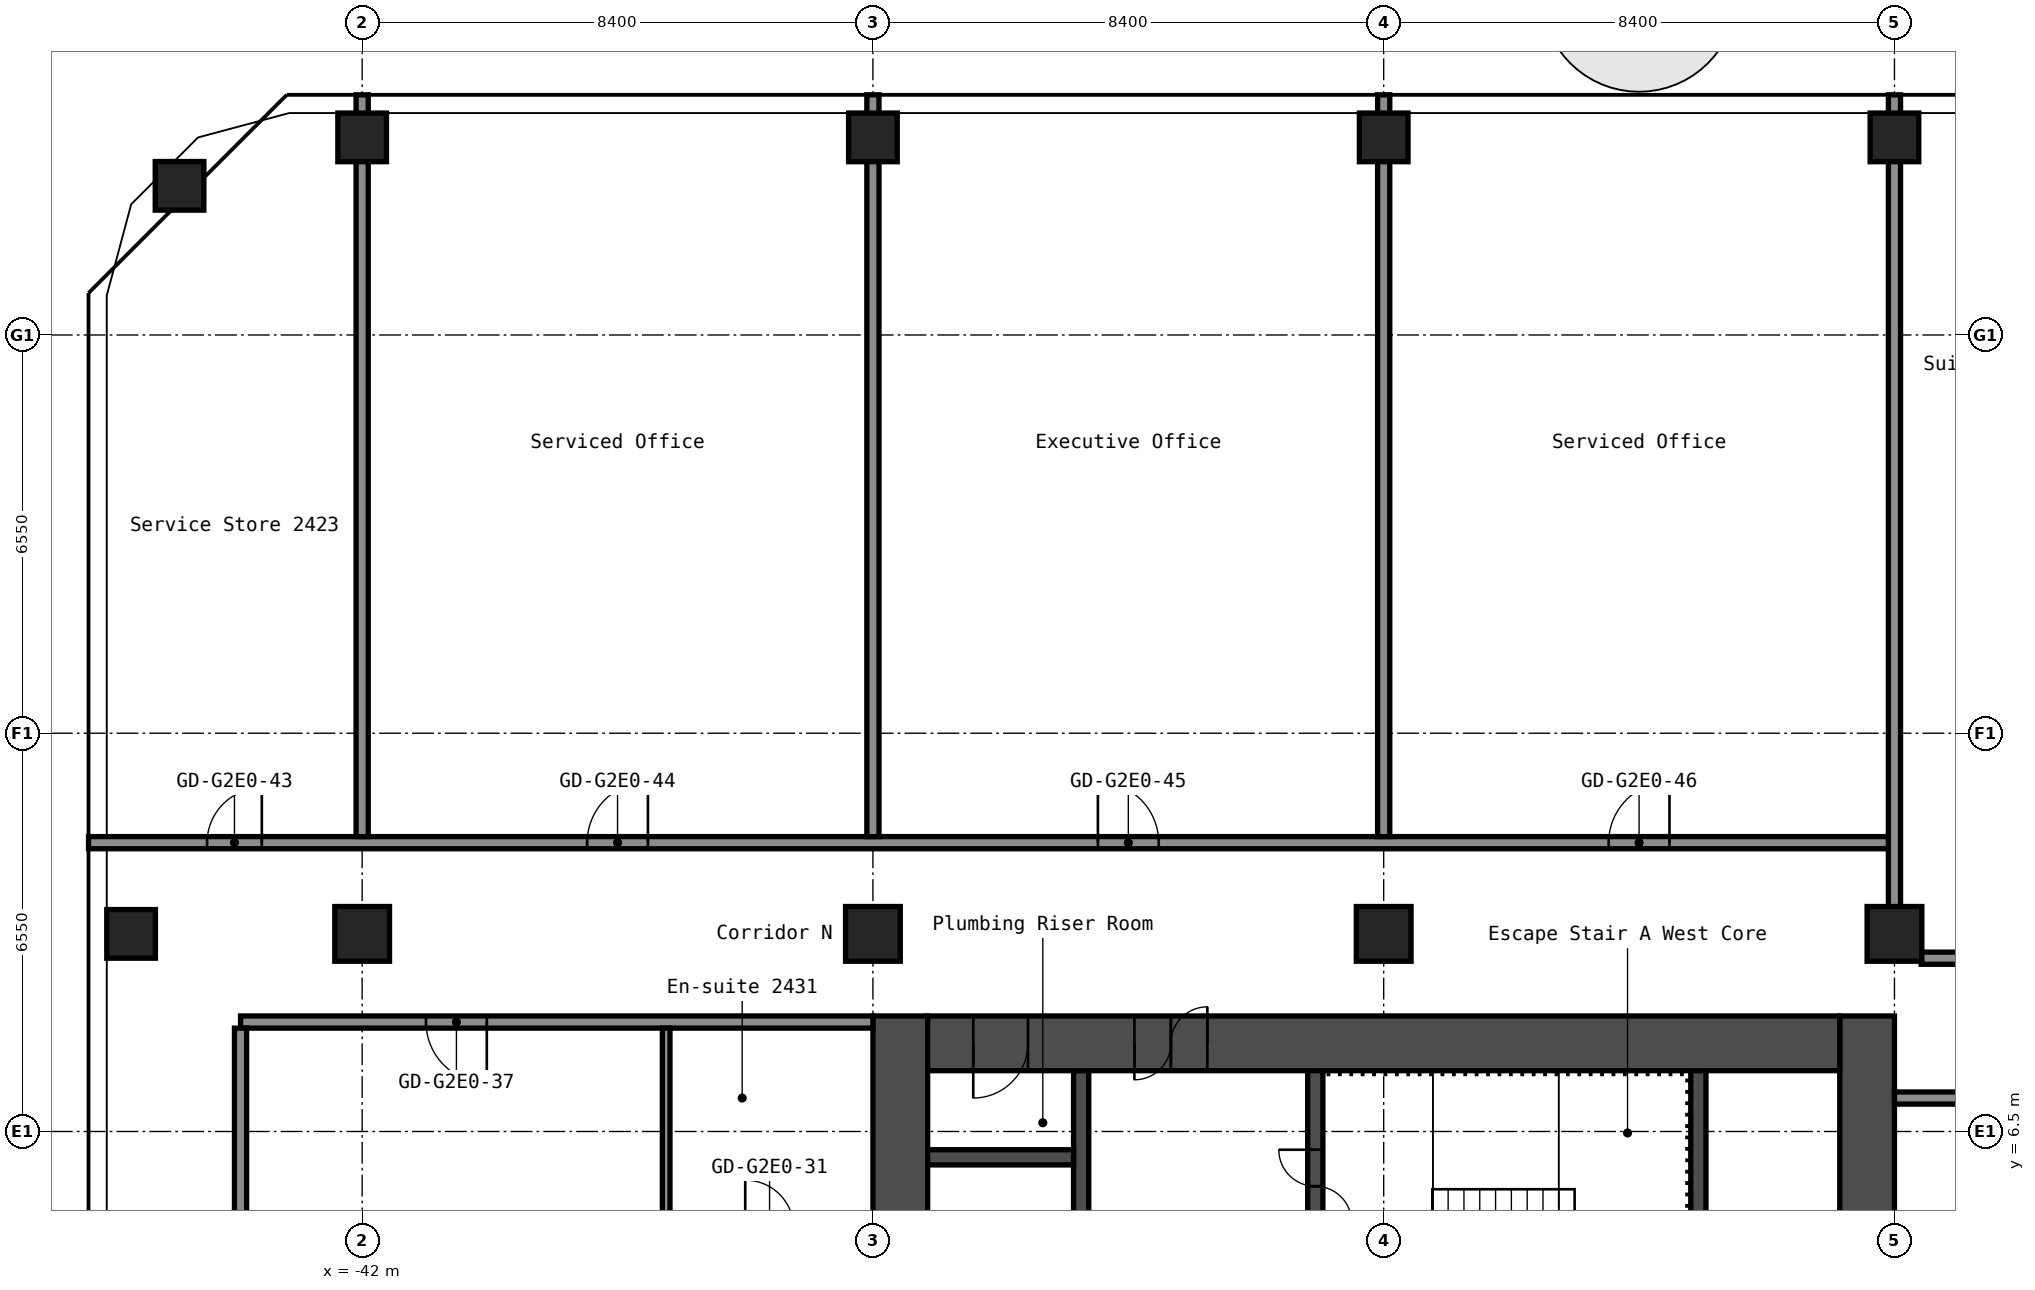
"""IFC4 building model, lengths in metres.
Left out: names, types, materials, properties, quantities, classifications, styles, units other than length and angle.
Written with IfcOpenShell. Run it as: python <this file> out.ifc"""

import sys

from ifc_helpers import new_model, si_unit, direction, frame, frame_2d, origin, origin_2d, place, context, subcontext, project, spatial, rectangle, hollow_rectangle, extrude, element, fill, save


model = new_model("IFC4")
c1 = context("Model", 3, precision=1e-05, world=origin(), true_north=direction((0.0, 1.0)))
c2 = subcontext(c1, "Body", "Model", "MODEL_VIEW")
j1 = project(units=[si_unit("LENGTHUNIT", "METRE"), si_unit("PLANEANGLEUNIT", "RADIAN")], contexts=[c1])
p1 = place(None, origin())
s1 = spatial("IfcSite", under=j1, at=p1, CompositionType="ELEMENT")
p2 = place(p1, origin())
s2 = spatial("IfcBuilding", under=s1, at=p2, CompositionType="ELEMENT")
p3 = place(p2, frame((0.0, 0.0, 88.2)))
s3 = spatial("IfcBuildingStorey", under=s2, at=p3, CompositionType="ELEMENT", Elevation=88.2)
for number, where, z_axis, x_axis in (
    (1, (-45.8, 9.75, 0.0), (0.0, 0.0, 1.0), (1.0, 0.0, 0.0)),
    (2, (-45.003, 22.053, 0.0), (0.0, 0.0, 1.0), (1.0, 0.0, 0.0)),
):
    element("IfcColumn", number, at=place(p3, frame(where, z_axis=z_axis, x_axis=x_axis)), inside=s3, PredefinedType="COLUMN", context=c2, shape_type="SweptSolid", body=[
        extrude(hollow_rectangle(XDim=0.8, YDim=0.8, WallThickness=0.032, at=origin_2d()), origin(), (0.0, 0.0, 1.0), 2.8),
    ])
p4 = place(p3, frame((-42.0, 9.75, 0.0), z_axis=(0.0, 0.0, 1.0), x_axis=(1.0, 0.0, 0.0)))
e3 = element("IfcColumn", 3, at=p4, inside=s3, PredefinedType="COLUMN", context=c2, shape_type="SweptSolid", body=[
    extrude(hollow_rectangle(XDim=0.9, YDim=0.9, WallThickness=0.036, at=origin_2d()), origin(), (0.0, 0.0, 1.0), 2.8),
])
p5 = place(p3, frame((-42.0, 22.85, 0.0), z_axis=(0.0, 0.0, 1.0), x_axis=(1.0, 0.0, 0.0)))
e4 = element("IfcColumn", 4, at=p5, inside=s3, PredefinedType="COLUMN", context=c2, shape_type="SweptSolid", body=[
    extrude(hollow_rectangle(XDim=0.8, YDim=0.8, WallThickness=0.032, at=origin_2d()), origin(), (0.0, 0.0, 1.0), 2.8),
])
p6 = place(p3, frame((-33.6, 9.75, 0.0), z_axis=(0.0, 0.0, 1.0), x_axis=(1.0, 0.0, 0.0)))
e5 = element("IfcColumn", 5, at=p6, inside=s3, PredefinedType="COLUMN", context=c2, shape_type="SweptSolid", body=[
    extrude(hollow_rectangle(XDim=0.9, YDim=0.9, WallThickness=0.036, at=origin_2d()), origin(), (0.0, 0.0, 1.0), 2.8),
])
p7 = place(p3, frame((-33.6, 22.85, 0.0), z_axis=(0.0, 0.0, 1.0), x_axis=(1.0, 0.0, 0.0)))
e6 = element("IfcColumn", 6, at=p7, inside=s3, PredefinedType="COLUMN", context=c2, shape_type="SweptSolid", body=[
    extrude(hollow_rectangle(XDim=0.8, YDim=0.8, WallThickness=0.032, at=origin_2d()), origin(), (0.0, 0.0, 1.0), 2.8),
])
p8 = place(p3, frame((-25.2, 9.75, 0.0), z_axis=(0.0, 0.0, 1.0), x_axis=(1.0, 0.0, 0.0)))
e7 = element("IfcColumn", 7, at=p8, inside=s3, PredefinedType="COLUMN", context=c2, shape_type="SweptSolid", body=[
    extrude(hollow_rectangle(XDim=0.9, YDim=0.9, WallThickness=0.036, at=origin_2d()), origin(), (0.0, 0.0, 1.0), 2.8),
])
p9 = place(p3, frame((-25.2, 22.85, 0.0), z_axis=(0.0, 0.0, 1.0), x_axis=(1.0, 0.0, 0.0)))
e8 = element("IfcColumn", 8, at=p9, inside=s3, PredefinedType="COLUMN", context=c2, shape_type="SweptSolid", body=[
    extrude(hollow_rectangle(XDim=0.8, YDim=0.8, WallThickness=0.032, at=origin_2d()), origin(), (0.0, 0.0, 1.0), 2.8),
])
p10 = place(p3, frame((-16.8, 9.75, 0.0), z_axis=(0.0, 0.0, 1.0), x_axis=(1.0, 0.0, 0.0)))
e9 = element("IfcColumn", 9, at=p10, inside=s3, PredefinedType="COLUMN", context=c2, shape_type="SweptSolid", body=[
    extrude(hollow_rectangle(XDim=0.9, YDim=0.9, WallThickness=0.036, at=origin_2d()), origin(), (0.0, 0.0, 1.0), 2.8),
])
p11 = place(p3, frame((-16.8, 22.85, 0.0), z_axis=(0.0, 0.0, 1.0), x_axis=(1.0, 0.0, 0.0)))
e10 = element("IfcColumn", 10, at=p11, inside=s3, PredefinedType="COLUMN", context=c2, shape_type="SweptSolid", body=[
    extrude(hollow_rectangle(XDim=0.8, YDim=0.8, WallThickness=0.032, at=origin_2d()), origin(), (0.0, 0.0, 1.0), 2.8),
])
p12 = place(p3, frame((-17.25, -8.4, 0.0), z_axis=(0.0, 0.0, 1.0), x_axis=(0.0, 1.0, 0.0)))
e11 = element("IfcWall", 11, at=p12, inside=s3, PredefinedType="SHEAR", context=c2, shape_type="SweptSolid", body=[
    extrude(rectangle(XDim=16.8, YDim=0.9, at=frame_2d((8.4, 0.0))), origin(), (0.0, 0.0, 1.0), 2.8),
])
p13 = place(p12, frame((7.6, 0.0, 0.0)))
e12 = element("IfcOpeningElement", 12, at=p13, cuts=e11, PredefinedType="OPENING", context=c2, shape_type="SweptSolid", body=[
    extrude(rectangle(XDim=1.2, YDim=2.1, at=frame_2d((0.6, 1.05))), frame((0.0, 0.46, 0.0), z_axis=(0.0, -1.0, 0.0), x_axis=(1.0, 0.0, 0.0)), (0.0, 0.0, 1.0), 0.92),
])
p14 = place(p3, frame((-33.15, -8.4, 0.0), z_axis=(0.0, 0.0, 1.0), x_axis=(0.0, 1.0, 0.0)))
e13 = element("IfcWall", 13, at=p14, inside=s3, PredefinedType="SHEAR", context=c2, shape_type="SweptSolid", body=[
    extrude(rectangle(XDim=16.8, YDim=0.9, at=frame_2d((8.4, 0.0))), origin(), (0.0, 0.0, 1.0), 2.8),
])
p15 = place(p3, frame((-32.7, 7.95, 0.0), z_axis=(0.0, 0.0, 1.0), x_axis=(1.0, 0.0, 0.0)))
e14 = element("IfcWall", 14, at=p15, inside=s3, PredefinedType="SHEAR", context=c2, shape_type="SweptSolid", body=[
    extrude(rectangle(XDim=15.0, YDim=0.9, at=frame_2d((7.5, 0.0))), origin(), (0.0, 0.0, 1.0), 2.8),
])
p16 = place(p15, frame((3.4, 0.0, 0.0)))
e15 = element("IfcOpeningElement", 15, at=p16, cuts=e14, PredefinedType="OPENING", context=c2, shape_type="SweptSolid", body=[
    extrude(rectangle(XDim=1.2, YDim=2.1, at=frame_2d((0.6, 1.05))), frame((0.0, 0.46, 0.0), z_axis=(0.0, -1.0, 0.0), x_axis=(1.0, 0.0, 0.0)), (0.0, 0.0, 1.0), 0.92),
])
p17 = place(p15, frame((0.75, 0.0, 0.0)))
e16 = element("IfcOpeningElement", 16, at=p17, cuts=e14, PredefinedType="OPENING", context=c2, shape_type="SweptSolid", body=[
    extrude(rectangle(XDim=0.9, YDim=2.1, at=frame_2d((0.45, 1.05))), frame((0.0, 0.46, 0.0), z_axis=(0.0, -1.0, 0.0), x_axis=(1.0, 0.0, 0.0)), (0.0, 0.0, 1.0), 0.92),
])
p18 = place(p3, frame((-20.025, 1.2, 0.0), z_axis=(0.0, 0.0, 1.0), x_axis=(0.0, 1.0, 0.0)))
e17 = element("IfcWall", 17, at=p18, inside=s3, PredefinedType="SHEAR", context=c2, shape_type="SweptSolid", body=[
    extrude(rectangle(XDim=6.3, YDim=0.25, at=frame_2d((3.15, 0.0))), origin(), (0.0, 0.0, 1.0), 2.8),
])
p19 = place(p3, frame((-26.325, 3.75, 0.0), z_axis=(0.0, 0.0, 1.0), x_axis=(0.0, 1.0, 0.0)))
e18 = element("IfcWall", 18, at=p19, inside=s3, PredefinedType="SHEAR", context=c2, shape_type="SweptSolid", body=[
    extrude(rectangle(XDim=3.75, YDim=0.25, at=frame_2d((1.875, 0.0))), origin(), (0.0, 0.0, 1.0), 2.8),
])
p20 = place(p19, frame((1.25, 0.0, 0.0)))
e19 = element("IfcOpeningElement", 19, at=p20, cuts=e18, PredefinedType="OPENING", context=c2, shape_type="SweptSolid", body=[
    extrude(rectangle(XDim=1.2, YDim=2.1, at=frame_2d((0.6, 1.05))), frame((0.0, 0.135, 0.0), z_axis=(0.0, -1.0, 0.0), x_axis=(1.0, 0.0, 0.0)), (0.0, 0.0, 1.0), 0.27),
])
p21 = place(p3, frame((-30.175, 1.45, 0.0), z_axis=(0.0, 0.0, 1.0), x_axis=(0.0, 1.0, 0.0)))
e20 = element("IfcWall", 20, at=p21, inside=s3, PredefinedType="SHEAR", context=c2, shape_type="SweptSolid", body=[
    extrude(rectangle(XDim=6.05, YDim=0.25, at=frame_2d((3.025, 0.0))), origin(), (0.0, 0.0, 1.0), 2.8),
])
p22 = place(p21, frame((2.625, 0.0, 0.0)))
e21 = element("IfcOpeningElement", 21, at=p22, cuts=e20, PredefinedType="OPENING", context=c2, shape_type="SweptSolid", body=[
    extrude(rectangle(XDim=1.1, YDim=2.1, at=frame_2d((0.55, 1.05))), frame((0.0, 0.135, 0.0), z_axis=(0.0, -1.0, 0.0), x_axis=(1.0, 0.0, 0.0)), (0.0, 0.0, 1.0), 0.27),
])
p23 = place(p3, frame((-32.7, 6.075, 0.0), z_axis=(0.0, 0.0, 1.0), x_axis=(1.0, 0.0, 0.0)))
e22 = element("IfcWall", 22, at=p23, inside=s3, PredefinedType="SHEAR", context=c2, shape_type="SweptSolid", body=[
    extrude(rectangle(XDim=2.4, YDim=0.25, at=frame_2d((1.2, 0.0))), origin(), (0.0, 0.0, 1.0), 2.8),
])
p24 = place(p3, frame((-16.8, 7.05, 0.0), z_axis=(0.0, 0.0, 1.0), x_axis=(1.0, 0.0, 0.0)))
e23 = element("IfcWall", 23, at=p24, inside=s3, PredefinedType="PARTITIONING", context=c2, shape_type="SweptSolid", body=[
    extrude(rectangle(XDim=33.6, YDim=0.2, at=frame_2d((16.8, 0.0))), origin(), (0.0, 0.0, 1.0), 2.8),
])
p25 = place(p24, frame((1.82, 0.0, 0.0)))
e24 = element("IfcOpeningElement", 24, at=p25, cuts=e23, PredefinedType="OPENING", context=c2, shape_type="SweptSolid", body=[
    extrude(rectangle(XDim=0.9, YDim=2.1, at=frame_2d((0.45, 1.05))), frame((0.0, 0.11, 0.0), z_axis=(0.0, -1.0, 0.0), x_axis=(1.0, 0.0, 0.0)), (0.0, 0.0, 1.0), 0.22),
])
p26 = place(p24, frame((6.02, 0.0, 0.0)))
e25 = element("IfcOpeningElement", 25, at=p26, cuts=e23, PredefinedType="OPENING", context=c2, shape_type="SweptSolid", body=[
    extrude(rectangle(XDim=0.9, YDim=2.1, at=frame_2d((0.45, 1.05))), frame((0.0, 0.11, 0.0), z_axis=(0.0, -1.0, 0.0), x_axis=(1.0, 0.0, 0.0)), (0.0, 0.0, 1.0), 0.22),
])
p27 = place(p24, frame((18.87, 0.0, 0.0)))
e26 = element("IfcOpeningElement", 26, at=p27, cuts=e23, PredefinedType="OPENING", context=c2, shape_type="SweptSolid", body=[
    extrude(rectangle(XDim=0.9, YDim=2.1, at=frame_2d((0.45, 1.05))), frame((0.0, 0.11, 0.0), z_axis=(0.0, -1.0, 0.0), x_axis=(1.0, 0.0, 0.0)), (0.0, 0.0, 1.0), 0.22),
])
p28 = place(p24, frame((23.07, 0.0, 0.0)))
e27 = element("IfcOpeningElement", 27, at=p28, cuts=e23, PredefinedType="OPENING", context=c2, shape_type="SweptSolid", body=[
    extrude(rectangle(XDim=0.9, YDim=2.1, at=frame_2d((0.45, 1.05))), frame((0.0, 0.11, 0.0), z_axis=(0.0, -1.0, 0.0), x_axis=(1.0, 0.0, 0.0)), (0.0, 0.0, 1.0), 0.22),
])
p29 = place(p3, frame((-44.0, 8.3, 0.0), z_axis=(0.0, 0.0, 1.0), x_axis=(1.0, 0.0, 0.0)))
e28 = element("IfcWall", 28, at=p29, inside=s3, PredefinedType="PARTITIONING", context=c2, shape_type="SweptSolid", body=[
    extrude(rectangle(XDim=10.4, YDim=0.2, at=frame_2d((5.2, 0.0))), origin(), (0.0, 0.0, 1.0), 2.8),
])
p30 = place(p29, frame((3.05, 0.0, 0.0)))
e29 = element("IfcOpeningElement", 29, at=p30, cuts=e28, PredefinedType="OPENING", context=c2, shape_type="SweptSolid", body=[
    extrude(rectangle(XDim=1.0, YDim=2.1, at=frame_2d((0.5, 1.05))), frame((0.0, 0.11, 0.0), z_axis=(0.0, -1.0, 0.0), x_axis=(1.0, 0.0, 0.0)), (0.0, 0.0, 1.0), 0.22),
])
p31 = place(p3, frame((-16.36, 9.35, 0.0), z_axis=(0.0, 0.0, 1.0), x_axis=(1.0, 0.0, 0.0)))
e30 = element("IfcWall", 30, at=p31, inside=s3, PredefinedType="PARTITIONING", context=c2, shape_type="SweptSolid", body=[
    extrude(rectangle(XDim=32.72, YDim=0.2, at=frame_2d((16.36, 0.0))), origin(), (0.0, 0.0, 1.0), 2.8),
])
p32 = place(p31, frame((1.16, 0.0, 0.0)))
e31 = element("IfcOpeningElement", 31, at=p32, cuts=e30, PredefinedType="OPENING", context=c2, shape_type="SweptSolid", body=[
    extrude(rectangle(XDim=1.0, YDim=2.1, at=frame_2d((0.5, 1.05))), frame((0.0, 0.11, 0.0), z_axis=(0.0, -1.0, 0.0), x_axis=(1.0, 0.0, 0.0)), (0.0, 0.0, 1.0), 0.22),
])
p33 = place(p31, frame((9.56, 0.0, 0.0)))
e32 = element("IfcOpeningElement", 32, at=p33, cuts=e30, PredefinedType="OPENING", context=c2, shape_type="SweptSolid", body=[
    extrude(rectangle(XDim=1.0, YDim=2.1, at=frame_2d((0.5, 1.05))), frame((0.0, 0.11, 0.0), z_axis=(0.0, -1.0, 0.0), x_axis=(1.0, 0.0, 0.0)), (0.0, 0.0, 1.0), 0.22),
])
p34 = place(p31, frame((22.16, 0.0, 0.0)))
e33 = element("IfcOpeningElement", 33, at=p34, cuts=e30, PredefinedType="OPENING", context=c2, shape_type="SweptSolid", body=[
    extrude(rectangle(XDim=1.0, YDim=2.1, at=frame_2d((0.5, 1.05))), frame((0.0, 0.11, 0.0), z_axis=(0.0, -1.0, 0.0), x_axis=(1.0, 0.0, 0.0)), (0.0, 0.0, 1.0), 0.22),
])
p35 = place(p31, frame((30.56, 0.0, 0.0)))
e34 = element("IfcOpeningElement", 34, at=p35, cuts=e30, PredefinedType="OPENING", context=c2, shape_type="SweptSolid", body=[
    extrude(rectangle(XDim=1.0, YDim=2.1, at=frame_2d((0.5, 1.05))), frame((0.0, 0.11, 0.0), z_axis=(0.0, -1.0, 0.0), x_axis=(1.0, 0.0, 0.0)), (0.0, 0.0, 1.0), 0.22),
])
p36 = place(p3, frame((-46.5, 11.25, 0.0), z_axis=(0.0, 0.0, 1.0), x_axis=(1.0, 0.0, 0.0)))
e35 = element("IfcWall", 35, at=p36, inside=s3, PredefinedType="PARTITIONING", context=c2, shape_type="SweptSolid", body=[
    extrude(rectangle(XDim=29.7, YDim=0.2, at=frame_2d((14.85, 0.0))), origin(), (0.0, 0.0, 1.0), 2.8),
])
p37 = place(p36, frame((1.95, 0.0, 0.0)))
e36 = element("IfcOpeningElement", 36, at=p37, cuts=e35, PredefinedType="OPENING", context=c2, shape_type="SweptSolid", body=[
    extrude(rectangle(XDim=0.9, YDim=2.1, at=frame_2d((0.45, 1.05))), frame((0.0, 0.11, 0.0), z_axis=(0.0, -1.0, 0.0), x_axis=(1.0, 0.0, 0.0)), (0.0, 0.0, 1.0), 0.22),
])
p38 = place(p36, frame((8.2, 0.0, 0.0)))
e37 = element("IfcOpeningElement", 37, at=p38, cuts=e35, PredefinedType="OPENING", context=c2, shape_type="SweptSolid", body=[
    extrude(rectangle(XDim=1.0, YDim=2.1, at=frame_2d((0.5, 1.05))), frame((0.0, 0.11, 0.0), z_axis=(0.0, -1.0, 0.0), x_axis=(1.0, 0.0, 0.0)), (0.0, 0.0, 1.0), 0.22),
])
p39 = place(p36, frame((16.6, 0.0, 0.0)))
e38 = element("IfcOpeningElement", 38, at=p39, cuts=e35, PredefinedType="OPENING", context=c2, shape_type="SweptSolid", body=[
    extrude(rectangle(XDim=1.0, YDim=2.1, at=frame_2d((0.5, 1.05))), frame((0.0, 0.11, 0.0), z_axis=(0.0, -1.0, 0.0), x_axis=(1.0, 0.0, 0.0)), (0.0, 0.0, 1.0), 0.22),
])
p40 = place(p36, frame((25.0, 0.0, 0.0)))
e39 = element("IfcOpeningElement", 39, at=p40, cuts=e35, PredefinedType="OPENING", context=c2, shape_type="SweptSolid", body=[
    extrude(rectangle(XDim=1.0, YDim=2.1, at=frame_2d((0.5, 1.05))), frame((0.0, 0.11, 0.0), z_axis=(0.0, -1.0, 0.0), x_axis=(1.0, 0.0, 0.0)), (0.0, 0.0, 1.0), 0.22),
])
p41 = place(p3, frame((-44.0, -8.2, 0.0), z_axis=(0.0, 0.0, 1.0), x_axis=(0.0, 1.0, 0.0)))
e40 = element("IfcWall", 40, at=p41, inside=s3, PredefinedType="PARTITIONING", context=c2, shape_type="SweptSolid", body=[
    extrude(rectangle(XDim=16.4, YDim=0.2, at=frame_2d((8.2, 0.0))), origin(), (0.0, 0.0, 1.0), 2.8),
])
p42 = place(p3, frame((-42.0, 11.35, 0.0), z_axis=(0.0, 0.0, 1.0), x_axis=(0.0, 1.0, 0.0)))
e41 = element("IfcWall", 41, at=p42, inside=s3, PredefinedType="PARTITIONING", context=c2, shape_type="SweptSolid", body=[
    extrude(rectangle(XDim=12.2, YDim=0.2, at=frame_2d((6.1, 0.0))), origin(), (0.0, 0.0, 1.0), 2.8),
])
p43 = place(p3, frame((-37.0, 4.9, 0.0), z_axis=(0.0, 0.0, 1.0), x_axis=(0.0, 1.0, 0.0)))
e42 = element("IfcWall", 42, at=p43, inside=s3, PredefinedType="PARTITIONING", context=c2, shape_type="SweptSolid", body=[
    extrude(rectangle(XDim=3.3, YDim=0.125, at=frame_2d((1.65, 0.0))), origin(), (0.0, 0.0, 1.0), 2.8),
])
for number, where, z_axis, x_axis in (
    (43, (-33.6, 11.35, 0.0), (0.0, 0.0, 1.0), (0.0, 1.0, 0.0)),
    (44, (-25.2, 11.35, 0.0), (0.0, 0.0, 1.0), (0.0, 1.0, 0.0)),
):
    element("IfcWall", number, at=place(p3, frame(where, z_axis=z_axis, x_axis=x_axis)), inside=s3, PredefinedType="PARTITIONING", context=c2, shape_type="SweptSolid", body=[
        extrude(rectangle(XDim=12.2, YDim=0.2, at=frame_2d((6.1, 0.0))), origin(), (0.0, 0.0, 1.0), 2.8),
    ])
p44 = place(p3, frame((-16.8, 10.19, 0.0), z_axis=(0.0, 0.0, 1.0), x_axis=(0.0, 1.0, 0.0)))
e45 = element("IfcWall", 45, at=p44, inside=s3, PredefinedType="PARTITIONING", context=c2, shape_type="SweptSolid", body=[
    extrude(rectangle(XDim=13.36, YDim=0.2, at=frame_2d((6.68, 0.0))), origin(), (0.0, 0.0, 1.0), 2.8),
])
p45 = place(p16, origin())
e46 = element("IfcDoor", 46, at=p45, inside=s3, OperationType="DOUBLE_DOOR_SINGLE_SWING", PredefinedType="DOOR", context=c2, shape_type="SweptSolid", body=[
    extrude(rectangle(XDim=1.2, YDim=2.1, at=frame_2d((0.6, 1.05))), frame((0.0, 0.025, 0.0), z_axis=(0.0, -1.0, 0.0), x_axis=(1.0, 0.0, 0.0)), (0.0, 0.0, 1.0), 0.05),
])
fill(e15, e46)
p46 = place(p17, origin())
e47 = element("IfcDoor", 47, at=p46, inside=s3, OperationType="SINGLE_SWING_LEFT", PredefinedType="DOOR", context=c2, shape_type="SweptSolid", body=[
    extrude(rectangle(XDim=0.9, YDim=2.1, at=frame_2d((0.45, 1.05))), frame((0.0, 0.025, 0.0), z_axis=(0.0, -1.0, 0.0), x_axis=(1.0, 0.0, 0.0)), (0.0, 0.0, 1.0), 0.05),
])
fill(e16, e47)
p47 = place(p20, origin())
e48 = element("IfcDoor", 48, at=p47, inside=s3, OperationType="DOUBLE_DOOR_SINGLE_SWING", PredefinedType="DOOR", context=c2, shape_type="SweptSolid", body=[
    extrude(rectangle(XDim=1.2, YDim=2.1, at=frame_2d((0.6, 1.05))), frame((0.0, 0.025, 0.0), z_axis=(0.0, -1.0, 0.0), x_axis=(1.0, 0.0, 0.0)), (0.0, 0.0, 1.0), 0.05),
])
fill(e19, e48)
p48 = place(p30, origin())
e49 = element("IfcDoor", 49, at=p48, inside=s3, OperationType="SINGLE_SWING_RIGHT", PredefinedType="DOOR", context=c2, shape_type="SweptSolid", body=[
    extrude(rectangle(XDim=1.0, YDim=2.1, at=frame_2d((0.5, 1.05))), frame((0.0, 0.025, 0.0), z_axis=(0.0, -1.0, 0.0), x_axis=(1.0, 0.0, 0.0)), (0.0, 0.0, 1.0), 0.05),
])
fill(e29, e49)
p49 = place(p37, origin())
e50 = element("IfcDoor", 50, at=p49, inside=s3, OperationType="SINGLE_SWING_LEFT", PredefinedType="DOOR", context=c2, shape_type="SweptSolid", body=[
    extrude(rectangle(XDim=0.9, YDim=2.1, at=frame_2d((0.45, 1.05))), frame((0.0, 0.025, 0.0), z_axis=(0.0, -1.0, 0.0), x_axis=(1.0, 0.0, 0.0)), (0.0, 0.0, 1.0), 0.05),
])
fill(e36, e50)
p50 = place(p38, origin())
e51 = element("IfcDoor", 51, at=p50, inside=s3, OperationType="SINGLE_SWING_LEFT", PredefinedType="DOOR", context=c2, shape_type="SweptSolid", body=[
    extrude(rectangle(XDim=1.0, YDim=2.1, at=frame_2d((0.5, 1.05))), frame((0.0, 0.025, 0.0), z_axis=(0.0, -1.0, 0.0), x_axis=(1.0, 0.0, 0.0)), (0.0, 0.0, 1.0), 0.05),
])
fill(e37, e51)
p51 = place(p39, origin())
e52 = element("IfcDoor", 52, at=p51, inside=s3, OperationType="SINGLE_SWING_RIGHT", PredefinedType="DOOR", context=c2, shape_type="SweptSolid", body=[
    extrude(rectangle(XDim=1.0, YDim=2.1, at=frame_2d((0.5, 1.05))), frame((0.0, 0.025, 0.0), z_axis=(0.0, -1.0, 0.0), x_axis=(1.0, 0.0, 0.0)), (0.0, 0.0, 1.0), 0.05),
])
fill(e38, e52)
p52 = place(p40, origin())
e53 = element("IfcDoor", 53, at=p52, inside=s3, OperationType="SINGLE_SWING_LEFT", PredefinedType="DOOR", context=c2, shape_type="SweptSolid", body=[
    extrude(rectangle(XDim=1.0, YDim=2.1, at=frame_2d((0.5, 1.05))), frame((0.0, 0.025, 0.0), z_axis=(0.0, -1.0, 0.0), x_axis=(1.0, 0.0, 0.0)), (0.0, 0.0, 1.0), 0.05),
])
fill(e39, e53)
save(model, sys.argv[1])
